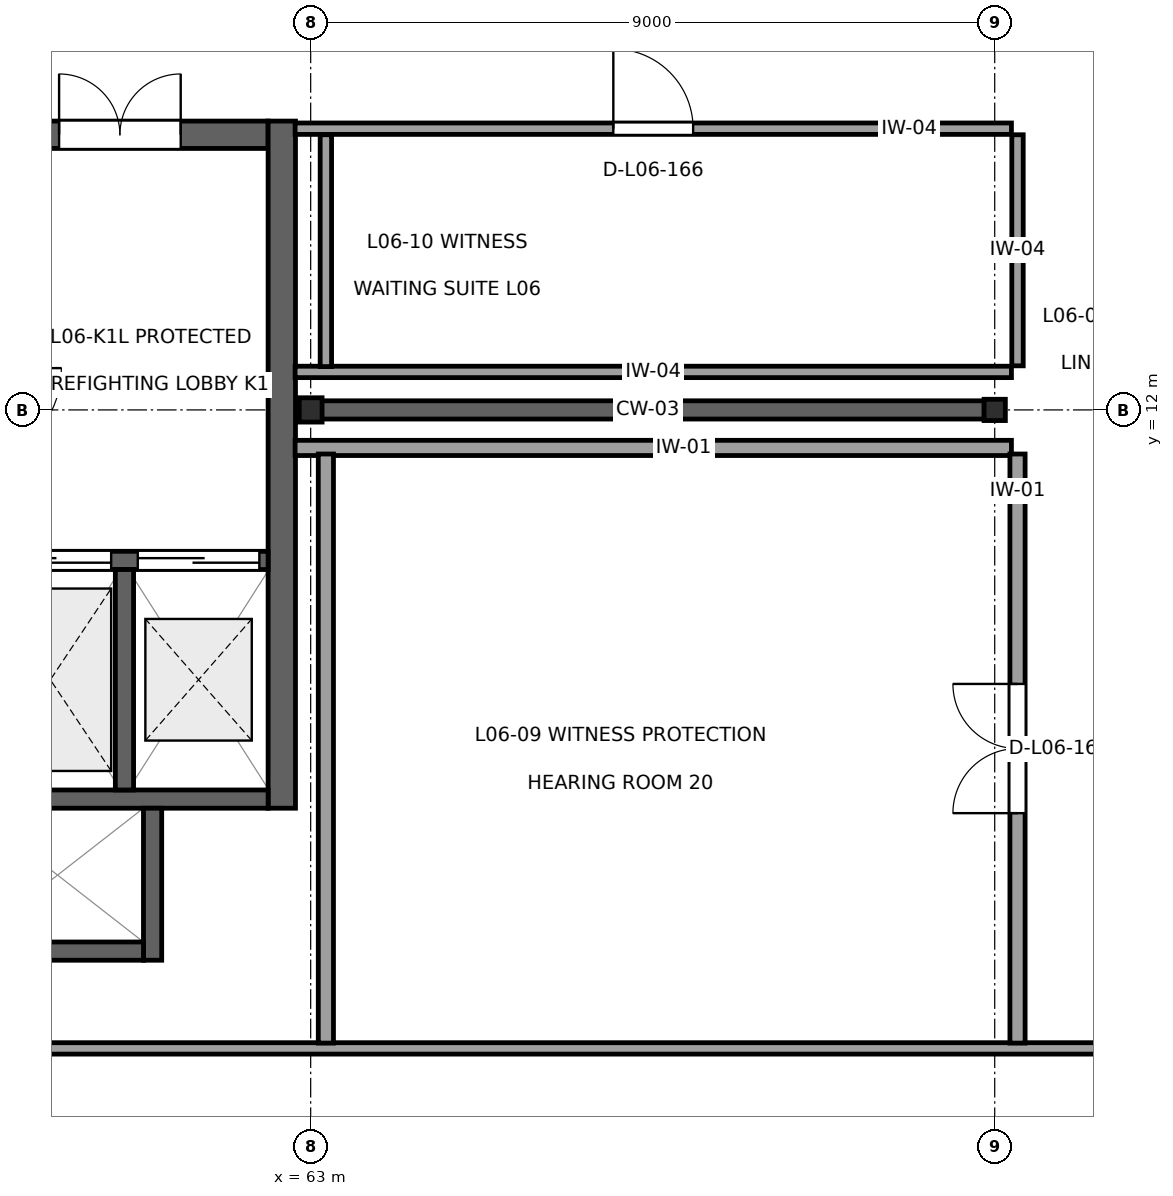
"""IFC4 building model, lengths in metres.
Left out: names, types, materials, properties, quantities, classifications, styles, units other than length and angle.
Written with IfcOpenShell. Run it as: python <this file> out.ifc"""

import sys

from ifc_helpers import new_model, si_unit, direction, frame, frame_2d, origin, origin_2d, place, context, subcontext, project, spatial, rectangle, i_section, extrude, element, fill, save


model = new_model("IFC4")
c1 = context("Model", 3, precision=1e-05, world=origin(), true_north=direction((0.0, 1.0)))
c2 = subcontext(c1, "Body", "Model", "MODEL_VIEW")
j1 = project(units=[si_unit("LENGTHUNIT", "METRE"), si_unit("PLANEANGLEUNIT", "RADIAN")], contexts=[c1])
p1 = place(None, origin())
s1 = spatial("IfcSite", under=j1, at=p1, CompositionType="ELEMENT")
p2 = place(p1, origin())
s2 = spatial("IfcBuilding", under=s1, at=p2, CompositionType="ELEMENT")
p3 = place(p2, frame((0.0, 0.0, 27.4)))
s3 = spatial("IfcBuildingStorey", under=s2, at=p3, CompositionType="ELEMENT", Elevation=27.4)
p4 = place(p3, frame((63.0, 12.0, 0.0), z_axis=(0.0, 0.0, 1.0), x_axis=(1.0, 0.0, 0.0)))
e1 = element("IfcColumn", 1, at=p4, inside=s3, PredefinedType="COLUMN", context=c2, shape_type="SweptSolid", body=[
    extrude(i_section(OverallWidth=0.3, OverallDepth=0.32, WebThickness=0.011, FlangeThickness=0.021, at=origin_2d()), origin(), (0.0, 0.0, 1.0), 4.0),
])
p5 = place(p3, frame((72.0, 12.0, 0.0), z_axis=(0.0, 0.0, 1.0), x_axis=(0.0, 1.0, 0.0)))
e2 = element("IfcColumn", 2, at=p5, inside=s3, PredefinedType="COLUMN", context=c2, shape_type="SweptSolid", body=[
    extrude(i_section(OverallWidth=0.28, OverallDepth=0.28, WebThickness=0.01, FlangeThickness=0.018, at=origin_2d()), origin(), (0.0, 0.0, 1.0), 4.0),
])
p6 = place(p3, frame((58.54, 15.62, 0.0), z_axis=(0.0, 0.0, 1.0), x_axis=(1.0, 0.0, 0.0)))
e3 = element("IfcWall", 3, at=p6, inside=s3, PredefinedType="SHEAR", context=c2, shape_type="SweptSolid", body=[
    extrude(rectangle(XDim=3.9, YDim=0.36, at=frame_2d((1.95, 0.0))), origin(), (0.0, 0.0, 1.0), 3.66),
])
p7 = place(p6, frame((1.15, 0.0, 0.0)))
e4 = element("IfcOpeningElement", 4, at=p7, cuts=e3, PredefinedType="OPENING", context=c2, shape_type="SweptSolid", body=[
    extrude(rectangle(XDim=1.6, YDim=2.25, at=frame_2d((0.8, 1.125))), frame((0.0, 0.195, 0.0), z_axis=(0.0, -1.0, 0.0), x_axis=(1.0, 0.0, 0.0)), (0.0, 0.0, 1.0), 0.39),
])
p8 = place(p3, frame((62.62, 6.76, 0.0), z_axis=(0.0, 0.0, 1.0), x_axis=(0.0, 1.0, 0.0)))
e5 = element("IfcWall", 5, at=p8, inside=s3, PredefinedType="SHEAR", context=c2, shape_type="SweptSolid", body=[
    extrude(rectangle(XDim=9.04, YDim=0.36, at=frame_2d((4.52, 0.0))), origin(), (0.0, 0.0, 1.0), 3.66),
])
p9 = place(p3, frame((58.54, 10.02, 0.0), z_axis=(0.0, 0.0, 1.0), x_axis=(1.0, 0.0, 0.0)))
e6 = element("IfcWall", 6, at=p9, inside=s3, PredefinedType="SHEAR", context=c2, shape_type="SweptSolid", body=[
    extrude(rectangle(XDim=3.9, YDim=0.24, at=frame_2d((1.95, 0.0))), origin(), (0.0, 0.0, 1.0), 3.81),
])
p10 = place(p9, frame((0.235, 0.0, 0.0)))
e7 = element("IfcOpeningElement", 7, at=p10, cuts=e6, PredefinedType="OPENING", context=c2, shape_type="SweptSolid", body=[
    extrude(rectangle(XDim=1.6, YDim=2.3, at=frame_2d((0.8, 1.15))), frame((0.0, 0.135, 0.0), z_axis=(0.0, -1.0, 0.0), x_axis=(1.0, 0.0, 0.0)), (0.0, 0.0, 1.0), 0.27),
])
p11 = place(p9, frame((2.185, 0.0, 0.0)))
e8 = element("IfcOpeningElement", 8, at=p11, cuts=e6, PredefinedType="OPENING", context=c2, shape_type="SweptSolid", body=[
    extrude(rectangle(XDim=1.6, YDim=2.3, at=frame_2d((0.8, 1.15))), frame((0.0, 0.135, 0.0), z_axis=(0.0, -1.0, 0.0), x_axis=(1.0, 0.0, 0.0)), (0.0, 0.0, 1.0), 0.27),
])
p12 = place(p3, frame((58.54, 6.88, 0.0), z_axis=(0.0, 0.0, 1.0), x_axis=(1.0, 0.0, 0.0)))
e9 = element("IfcWall", 9, at=p12, inside=s3, PredefinedType="SHEAR", context=c2, shape_type="SweptSolid", body=[
    extrude(rectangle(XDim=3.9, YDim=0.24, at=frame_2d((1.95, 0.0))), origin(), (0.0, 0.0, 1.0), 3.81),
])
p13 = place(p3, frame((60.55, 7.0, 0.0), z_axis=(0.0, 0.0, 1.0), x_axis=(0.0, 1.0, 0.0)))
e10 = element("IfcWall", 10, at=p13, inside=s3, PredefinedType="SHEAR", context=c2, shape_type="SweptSolid", body=[
    extrude(rectangle(XDim=2.9, YDim=0.24, at=frame_2d((1.45, 0.0))), origin(), (0.0, 0.0, 1.0), 3.81),
])
p14 = place(p3, frame((60.92, 4.76, 0.0), z_axis=(0.0, 0.0, 1.0), x_axis=(0.0, 1.0, 0.0)))
e11 = element("IfcWall", 11, at=p14, inside=s3, PredefinedType="SHEAR", context=c2, shape_type="SweptSolid", body=[
    extrude(rectangle(XDim=2.0, YDim=0.24, at=frame_2d((1.0, 0.0))), origin(), (0.0, 0.0, 1.0), 3.81),
])
p15 = place(p3, frame((58.54, 4.88, 0.0), z_axis=(0.0, 0.0, 1.0), x_axis=(1.0, 0.0, 0.0)))
e12 = element("IfcWall", 12, at=p15, inside=s3, PredefinedType="SHEAR", context=c2, shape_type="SweptSolid", body=[
    extrude(rectangle(XDim=2.26, YDim=0.24, at=frame_2d((1.13, 0.0))), origin(), (0.0, 0.0, 1.0), 3.81),
])
p16 = place(p3, frame((63.008, 12.0, 0.0), z_axis=(0.0, 0.0, 1.0), x_axis=(1.0, 0.0, 0.0)))
e13 = element("IfcWall", 13, at=p16, inside=s3, PredefinedType="SHEAR", context=c2, shape_type="SweptSolid", body=[
    extrude(rectangle(XDim=8.854, YDim=0.24, at=frame_2d((4.427, 0.0))), origin(), (0.0, 0.0, 1.0), 3.355),
])
p17 = place(p3, frame((45.88, 3.6, 0.0), z_axis=(0.0, 0.0, 1.0), x_axis=(1.0, 0.0, 0.0)))
e14 = element("IfcWall", 14, at=p17, inside=s3, PredefinedType="PARTITIONING", context=c2, shape_type="SweptSolid", body=[
    extrude(rectangle(XDim=58.24, YDim=0.15, at=frame_2d((29.12, 0.0))), origin(), (0.0, 0.0, 1.0), 3.64),
])
p18 = place(p17, frame((27.795, 0.0, 0.0)))
e15 = element("IfcOpeningElement", 15, at=p18, cuts=e14, PredefinedType="OPENING", context=c2, shape_type="SweptSolid", body=[
    extrude(rectangle(XDim=1.05, YDim=2.25, at=frame_2d((0.525, 1.125))), frame((0.0, 0.09, 0.0), z_axis=(0.0, -1.0, 0.0), x_axis=(1.0, 0.0, 0.0)), (0.0, 0.0, 1.0), 0.18),
])
p19 = place(p3, frame((62.795, 11.5, 0.0), z_axis=(0.0, 0.0, 1.0), x_axis=(1.0, 0.0, 0.0)))
e16 = element("IfcWall", 16, at=p19, inside=s3, PredefinedType="PARTITIONING", context=c2, shape_type="SweptSolid", body=[
    extrude(rectangle(XDim=9.425, YDim=0.2, at=frame_2d((4.712, 0.0))), origin(), (0.0, 0.0, 1.0), 3.64),
])
p20 = place(p3, frame((72.3, 11.42, 0.0), z_axis=(0.0, 0.0, 1.0), x_axis=(0.0, -1.0, 0.0)))
e17 = element("IfcWall", 17, at=p20, inside=s3, PredefinedType="PARTITIONING", context=c2, shape_type="SweptSolid", body=[
    extrude(rectangle(XDim=7.75, YDim=0.2, at=frame_2d((3.875, 0.0))), origin(), (0.0, 0.0, 1.0), 3.64),
])
p21 = place(p20, frame((3.025, 0.0, 0.0)))
e18 = element("IfcOpeningElement", 18, at=p21, cuts=e17, PredefinedType="OPENING", context=c2, shape_type="SweptSolid", body=[
    extrude(rectangle(XDim=1.7, YDim=2.4, at=frame_2d((0.85, 1.2))), frame((0.0, 0.115, 0.0), z_axis=(0.0, -1.0, 0.0), x_axis=(1.0, 0.0, 0.0)), (0.0, 0.0, 1.0), 0.23),
])
p22 = place(p3, frame((63.2, 3.67, 0.0), z_axis=(0.0, 0.0, 1.0), x_axis=(0.0, 1.0, 0.0)))
e19 = element("IfcWall", 19, at=p22, inside=s3, PredefinedType="PARTITIONING", context=c2, shape_type="SweptSolid", body=[
    extrude(rectangle(XDim=7.75, YDim=0.2, at=frame_2d((3.875, 0.0))), origin(), (0.0, 0.0, 1.0), 3.355),
])
p23 = place(p3, frame((72.22, 12.5, 0.0), z_axis=(0.0, 0.0, 1.0), x_axis=(-1.0, 0.0, 0.0)))
e20 = element("IfcWall", 20, at=p23, inside=s3, PredefinedType="PARTITIONING", context=c2, shape_type="SweptSolid", body=[
    extrude(rectangle(XDim=9.425, YDim=0.15, at=frame_2d((4.712, 0.0))), origin(), (0.0, 0.0, 1.0), 3.64),
])
p24 = place(p3, frame((63.2, 12.57, 0.0), z_axis=(0.0, 0.0, 1.0), x_axis=(0.0, 1.0, 0.0)))
e21 = element("IfcWall", 21, at=p24, inside=s3, PredefinedType="PARTITIONING", context=c2, shape_type="SweptSolid", body=[
    extrude(rectangle(XDim=3.05, YDim=0.15, at=frame_2d((1.525, 0.0))), origin(), (0.0, 0.0, 1.0), 3.355),
])
p25 = place(p3, frame((62.795, 15.7, 0.0), z_axis=(0.0, 0.0, 1.0), x_axis=(1.0, 0.0, 0.0)))
e22 = element("IfcWall", 22, at=p25, inside=s3, PredefinedType="PARTITIONING", context=c2, shape_type="SweptSolid", body=[
    extrude(rectangle(XDim=9.425, YDim=0.15, at=frame_2d((4.712, 0.0))), origin(), (0.0, 0.0, 1.0), 3.64),
])
p26 = place(p25, frame((4.187, 0.0, 0.0)))
e23 = element("IfcOpeningElement", 23, at=p26, cuts=e22, PredefinedType="OPENING", context=c2, shape_type="SweptSolid", body=[
    extrude(rectangle(XDim=1.05, YDim=2.25, at=frame_2d((0.525, 1.125))), frame((0.0, 0.09, 0.0), z_axis=(0.0, -1.0, 0.0), x_axis=(1.0, 0.0, 0.0)), (0.0, 0.0, 1.0), 0.18),
])
p27 = place(p3, frame((72.3, 15.62, 0.0), z_axis=(0.0, 0.0, 1.0), x_axis=(0.0, -1.0, 0.0)))
e24 = element("IfcWall", 24, at=p27, inside=s3, PredefinedType="PARTITIONING", context=c2, shape_type="SweptSolid", body=[
    extrude(rectangle(XDim=3.04, YDim=0.15, at=frame_2d((1.52, 0.0))), origin(), (0.0, 0.0, 1.0), 3.64),
])
p28 = place(p7, origin())
e25 = element("IfcDoor", 25, at=p28, inside=s3, OperationType="DOUBLE_DOOR_SINGLE_SWING", PredefinedType="DOOR", context=c2, shape_type="SweptSolid", body=[
    extrude(rectangle(XDim=1.6, YDim=2.25, at=frame_2d((0.8, 1.125))), frame((0.0, 0.025, 0.0), z_axis=(0.0, -1.0, 0.0), x_axis=(1.0, 0.0, 0.0)), (0.0, 0.0, 1.0), 0.05),
])
fill(e4, e25)
p29 = place(p10, origin())
e26 = element("IfcDoor", 26, at=p29, inside=s3, OperationType="DOUBLE_DOOR_SLIDING", PredefinedType="DOOR", context=c2, shape_type="SweptSolid", body=[
    extrude(rectangle(XDim=1.6, YDim=2.3, at=frame_2d((0.8, 1.15))), frame((0.0, 0.025, 0.0), z_axis=(0.0, -1.0, 0.0), x_axis=(1.0, 0.0, 0.0)), (0.0, 0.0, 1.0), 0.05),
])
fill(e7, e26)
p30 = place(p11, origin())
e27 = element("IfcDoor", 27, at=p30, inside=s3, OperationType="DOUBLE_DOOR_SLIDING", PredefinedType="DOOR", context=c2, shape_type="SweptSolid", body=[
    extrude(rectangle(XDim=1.6, YDim=2.3, at=frame_2d((0.8, 1.15))), frame((0.0, 0.025, 0.0), z_axis=(0.0, -1.0, 0.0), x_axis=(1.0, 0.0, 0.0)), (0.0, 0.0, 1.0), 0.05),
])
fill(e8, e27)
p31 = place(p21, frame((1.7, 0.0, 0.0), z_axis=(0.0, 0.0, 1.0), x_axis=(-1.0, 0.0, 0.0)))
e28 = element("IfcDoor", 28, at=p31, inside=s3, OperationType="DOUBLE_DOOR_SINGLE_SWING", PredefinedType="DOOR", context=c2, shape_type="SweptSolid", body=[
    extrude(rectangle(XDim=1.7, YDim=2.4, at=frame_2d((0.85, 1.2))), frame((0.0, 0.025, 0.0), z_axis=(0.0, -1.0, 0.0), x_axis=(1.0, 0.0, 0.0)), (0.0, 0.0, 1.0), 0.05),
])
fill(e18, e28)
p32 = place(p26, origin())
e29 = element("IfcDoor", 29, at=p32, inside=s3, OperationType="SINGLE_SWING_LEFT", PredefinedType="DOOR", context=c2, shape_type="SweptSolid", body=[
    extrude(rectangle(XDim=1.05, YDim=2.25, at=frame_2d((0.525, 1.125))), frame((0.0, 0.025, 0.0), z_axis=(0.0, -1.0, 0.0), x_axis=(1.0, 0.0, 0.0)), (0.0, 0.0, 1.0), 0.05),
])
fill(e23, e29)
save(model, sys.argv[1])
